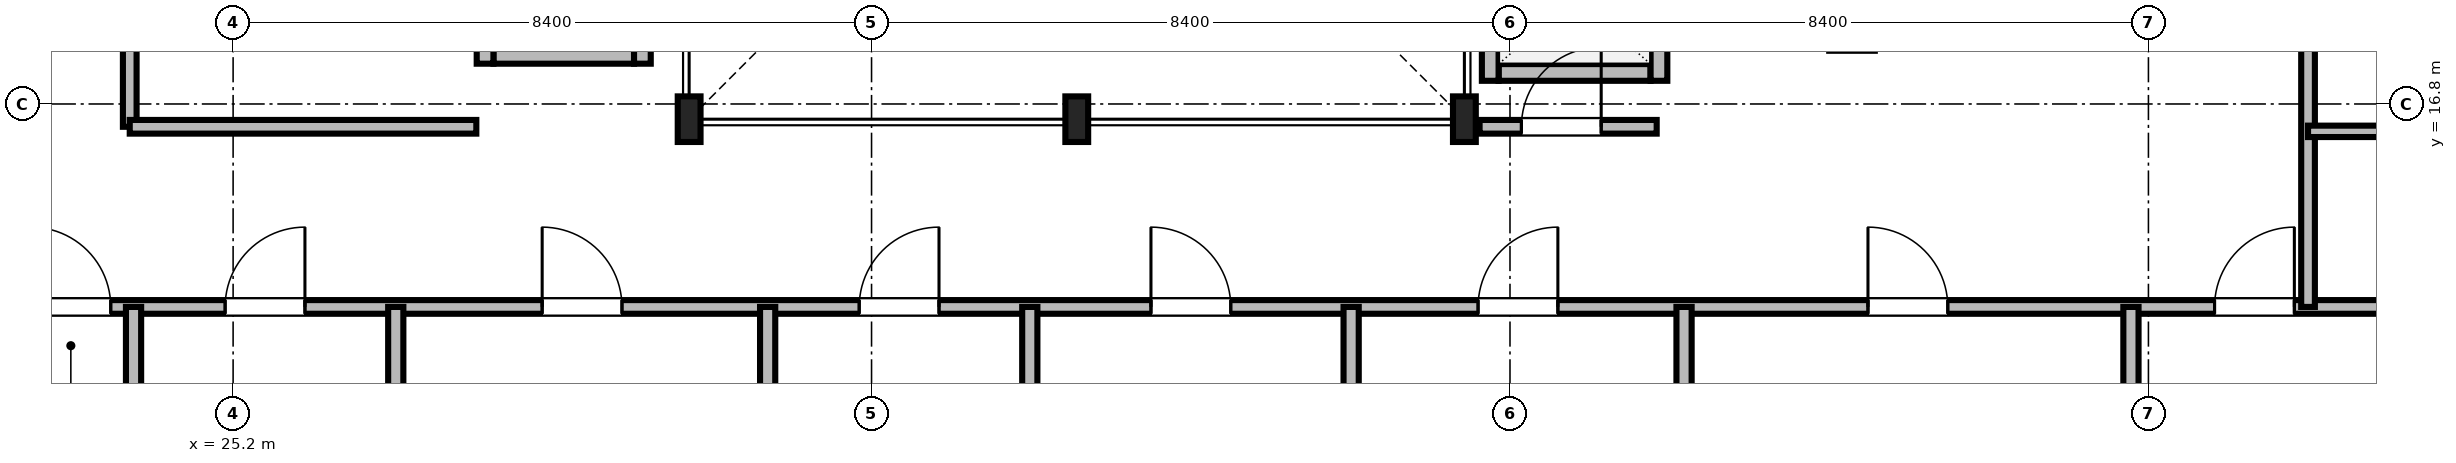
"""IFC4 building model, lengths in metres.
Left out: names, types, materials, properties, quantities, classifications, styles, units other than length and angle.
Written with IfcOpenShell. Run it as: python <this file> out.ifc"""

import sys

from ifc_helpers import new_model, si_unit, direction, frame, frame_2d, origin, origin_2d, place, context, subcontext, project, spatial, rectangle, i_section, extrude, source, transform, mapped, element, fill, save


model = new_model("IFC4")
c1 = context("Model", 3, precision=1e-05, world=origin(), true_north=direction((0.0, 1.0)))
c2 = subcontext(c1, "Body", "Model", "MODEL_VIEW")
j1 = project(units=[si_unit("LENGTHUNIT", "METRE"), si_unit("PLANEANGLEUNIT", "RADIAN")], contexts=[c1])
p1 = place(None, origin())
s1 = spatial("IfcSite", under=j1, at=p1, CompositionType="ELEMENT")
p2 = place(p1, origin())
s2 = spatial("IfcBuilding", under=s1, at=p2, CompositionType="ELEMENT")
p3 = place(p2, frame((0.0, 0.0, 266.4)))
s3 = spatial("IfcBuildingStorey", under=s2, at=p3, CompositionType="ELEMENT", Elevation=266.4)
m1 = source(origin(), c2, "Body", "SweptSolid", [
    extrude(i_section(OverallWidth=0.3, OverallDepth=0.6, WebThickness=0.015, FlangeThickness=0.03, FilletRadius=0.027, at=origin_2d()), origin(), (0.0, 0.0, 1.0), 3.65),
])
for number, where, z_axis, x_axis in (
    (1, (31.2, 16.6, 0.0), (0.0, 0.0, 1.0), (1.0, 0.0, 0.0)),
    (2, (36.3, 16.6, 0.0), (0.0, 0.0, 1.0), (1.0, 0.0, 0.0)),
    (3, (41.4, 16.6, 0.0), (0.0, 0.0, 1.0), (1.0, 0.0, 0.0)),
):
    element("IfcColumn", number, at=place(p3, frame(where, z_axis=z_axis, x_axis=x_axis)), inside=s3, PredefinedType="COLUMN", context=c2, shape_type="MappedRepresentation", body=[
        mapped(m1, transform((0.0, 0.0, 0.0), scale=1.0)),
    ])
m2 = source(origin(), c2, "Body", "SweptSolid", [
    extrude(rectangle(XDim=2.0, YDim=0.22, at=frame_2d((1.0, 0.0))), origin(), (0.0, 0.0, 1.0), 3.65),
])
p4 = place(p3, frame((41.85, 17.215, 0.0), z_axis=(0.0, 0.0, 1.0), x_axis=(1.0, 0.0, 0.0)))
e4 = element("IfcWall", 4, at=p4, inside=s3, PredefinedType="SOLIDWALL", context=c2, shape_type="MappedRepresentation", body=[
    mapped(m2, transform((0.0, 0.0, 0.0), scale=1.0)),
])
m3 = source(origin(), c2, "Body", "SweptSolid", [
    extrude(rectangle(XDim=2.19, YDim=0.22, at=frame_2d((1.095, 0.0))), origin(), (0.0, 0.0, 1.0), 3.65),
])
p5 = place(p3, frame((41.74, 17.105, 0.0), z_axis=(0.0, 0.0, 1.0), x_axis=(0.0, 1.0, 0.0)))
e5 = element("IfcWall", 5, at=p5, inside=s3, PredefinedType="SOLIDWALL", context=c2, shape_type="MappedRepresentation", body=[
    mapped(m3, transform((0.0, 0.0, 0.0), scale=1.0)),
])
p6 = place(p3, frame((43.96, 17.105, 0.0), z_axis=(0.0, 0.0, 1.0), x_axis=(0.0, 1.0, 0.0)))
e6 = element("IfcWall", 6, at=p6, inside=s3, PredefinedType="SOLIDWALL", context=c2, shape_type="MappedRepresentation", body=[
    mapped(m3, transform((0.0, 0.0, 0.0), scale=1.0)),
])
m4 = source(origin(), c2, "Body", "SweptSolid", [
    extrude(rectangle(XDim=1.1, YDim=2.2, at=frame_2d((0.55, 1.1))), frame((0.0, 0.12, 0.0), z_axis=(0.0, -1.0, 0.0), x_axis=(1.0, 0.0, 0.0)), (0.0, 0.0, 1.0), 0.24),
])
p7 = place(p6, frame((0.545, 0.0, 0.0)))
e7 = element("IfcOpeningElement", 7, at=p7, cuts=e6, PredefinedType="OPENING", context=c2, shape_type="MappedRepresentation", body=[
    mapped(m4, transform((0.0, 0.0, 0.0), scale=1.0)),
])
m5 = source(origin(), c2, "Body", "SweptSolid", [
    extrude(rectangle(XDim=1.85, YDim=0.22, at=frame_2d((0.925, 0.0))), origin(), (0.0, 0.0, 1.0), 3.65),
])
p8 = place(p3, frame((28.625, 17.44, 0.0), z_axis=(0.0, 0.0, 1.0), x_axis=(1.0, 0.0, 0.0)))
e8 = element("IfcWall", 8, at=p8, inside=s3, PredefinedType="SOLIDWALL", context=c2, shape_type="MappedRepresentation", body=[
    mapped(m5, transform((0.0, 0.0, 0.0), scale=1.0)),
])
m6 = source(origin(), c2, "Body", "SweptSolid", [
    extrude(rectangle(XDim=2.54, YDim=0.22, at=frame_2d((1.27, 0.0))), origin(), (0.0, 0.0, 1.0), 3.65),
])
for number, where, z_axis, x_axis in (
    (9, (28.515, 17.33, 0.0), (0.0, 0.0, 1.0), (0.0, 1.0, 0.0)),
    (10, (30.585, 17.33, 0.0), (0.0, 0.0, 1.0), (0.0, 1.0, 0.0)),
):
    element("IfcWall", number, at=place(p3, frame(where, z_axis=z_axis, x_axis=x_axis)), inside=s3, PredefinedType="SOLIDWALL", context=c2, shape_type="MappedRepresentation", body=[
        mapped(m6, transform((0.0, 0.0, 0.0), scale=1.0)),
    ])
m7 = source(origin(), c2, "Body", "SweptSolid", [
    extrude(rectangle(XDim=42.916, YDim=0.18, at=frame_2d((21.458, 0.0))), origin(), (0.0, 0.0, 1.0), 2.892),
])
p9 = place(p3, frame((17.542, 14.13, 0.0), z_axis=(0.0, 0.0, 1.0), x_axis=(1.0, 0.0, 0.0)))
e11 = element("IfcWall", 11, at=p9, inside=s3, PredefinedType="PARTITIONING", context=c2, shape_type="MappedRepresentation", body=[
    mapped(m7, transform((0.0, 0.0, 0.0), scale=1.0)),
])
m8 = source(origin(), c2, "Body", "SweptSolid", [
    extrude(rectangle(XDim=1.05, YDim=2.2, at=frame_2d((0.525, 1.1))), frame((0.0, 0.1, 0.0), z_axis=(0.0, -1.0, 0.0), x_axis=(1.0, 0.0, 0.0)), (0.0, 0.0, 1.0), 0.2),
])
p10 = place(p9, frame((4.998, 0.0, 0.0)))
e12 = element("IfcOpeningElement", 12, at=p10, cuts=e11, PredefinedType="OPENING", context=c2, shape_type="MappedRepresentation", body=[
    mapped(m8, transform((0.0, 0.0, 0.0), scale=1.0)),
])
p11 = place(p9, frame((7.553, 0.0, 0.0)))
e13 = element("IfcOpeningElement", 13, at=p11, cuts=e11, PredefinedType="OPENING", context=c2, shape_type="MappedRepresentation", body=[
    mapped(m8, transform((0.0, 0.0, 0.0), scale=1.0)),
])
p12 = place(p9, frame((11.724, 0.0, 0.0)))
e14 = element("IfcOpeningElement", 14, at=p12, cuts=e11, PredefinedType="OPENING", context=c2, shape_type="MappedRepresentation", body=[
    mapped(m8, transform((0.0, 0.0, 0.0), scale=1.0)),
])
p13 = place(p9, frame((15.896, 0.0, 0.0)))
e15 = element("IfcOpeningElement", 15, at=p13, cuts=e11, PredefinedType="OPENING", context=c2, shape_type="MappedRepresentation", body=[
    mapped(m8, transform((0.0, 0.0, 0.0), scale=1.0)),
])
p14 = place(p9, frame((19.734, 0.0, 0.0)))
e16 = element("IfcOpeningElement", 16, at=p14, cuts=e11, PredefinedType="OPENING", context=c2, shape_type="MappedRepresentation", body=[
    mapped(m8, transform((0.0, 0.0, 0.0), scale=1.0)),
])
p15 = place(p9, frame((24.038, 0.0, 0.0)))
e17 = element("IfcOpeningElement", 17, at=p15, cuts=e11, PredefinedType="OPENING", context=c2, shape_type="MappedRepresentation", body=[
    mapped(m8, transform((0.0, 0.0, 0.0), scale=1.0)),
])
p16 = place(p9, frame((29.168, 0.0, 0.0)))
e18 = element("IfcOpeningElement", 18, at=p16, cuts=e11, PredefinedType="OPENING", context=c2, shape_type="MappedRepresentation", body=[
    mapped(m8, transform((0.0, 0.0, 0.0), scale=1.0)),
])
p17 = place(p9, frame((33.728, 0.0, 0.0)))
e19 = element("IfcOpeningElement", 19, at=p17, cuts=e11, PredefinedType="OPENING", context=c2, shape_type="MappedRepresentation", body=[
    mapped(m8, transform((0.0, 0.0, 0.0), scale=1.0)),
])
m9 = source(origin(), c2, "Body", "SweptSolid", [
    extrude(rectangle(XDim=26.97, YDim=0.18, at=frame_2d((13.485, 0.0))), origin(), (0.0, 0.0, 1.0), 3.092),
])
p18 = place(p3, frame((52.5, 14.13, 0.0), z_axis=(0.0, 0.0, 1.0), x_axis=(0.0, 1.0, 0.0)))
e20 = element("IfcWall", 20, at=p18, inside=s3, PredefinedType="PARTITIONING", context=c2, shape_type="MappedRepresentation", body=[
    mapped(m9, transform((0.0, 0.0, 0.0), scale=1.0)),
])
p19 = place(p18, frame((4.009, 0.0, 0.0)))
e21 = element("IfcOpeningElement", 21, at=p19, cuts=e20, PredefinedType="OPENING", context=c2, shape_type="MappedRepresentation", body=[
    mapped(m8, transform((0.0, 0.0, 0.0), scale=1.0)),
])
p20 = place(p18, frame((10.696, 0.0, 0.0)))
e22 = element("IfcOpeningElement", 22, at=p20, cuts=e20, PredefinedType="OPENING", context=c2, shape_type="MappedRepresentation", body=[
    mapped(m8, transform((0.0, 0.0, 0.0), scale=1.0)),
])
p21 = place(p18, frame((17.384, 0.0, 0.0)))
e23 = element("IfcOpeningElement", 23, at=p21, cuts=e20, PredefinedType="OPENING", context=c2, shape_type="MappedRepresentation", body=[
    mapped(m8, transform((0.0, 0.0, 0.0), scale=1.0)),
])
p22 = place(p18, frame((24.071, 0.0, 0.0)))
e24 = element("IfcOpeningElement", 24, at=p22, cuts=e20, PredefinedType="OPENING", context=c2, shape_type="MappedRepresentation", body=[
    mapped(m8, transform((0.0, 0.0, 0.0), scale=1.0)),
])
m10 = source(origin(), c2, "Body", "SweptSolid", [
    extrude(rectangle(XDim=3.55, YDim=0.18, at=frame_2d((1.775, 0.0))), origin(), (0.0, 0.0, 1.0), 3.65),
])
p23 = place(p3, frame((23.84, 16.5, 0.0), z_axis=(0.0, 0.0, 1.0), x_axis=(0.0, 1.0, 0.0)))
e25 = element("IfcWall", 25, at=p23, inside=s3, PredefinedType="PARTITIONING", context=c2, shape_type="MappedRepresentation", body=[
    mapped(m10, transform((0.0, 0.0, 0.0), scale=1.0)),
])
p24 = place(p23, frame((1.15, 0.0, 0.0)))
e26 = element("IfcOpeningElement", 26, at=p24, cuts=e25, PredefinedType="OPENING", context=c2, shape_type="MappedRepresentation", body=[
    mapped(m8, transform((0.0, 0.0, 0.0), scale=1.0)),
])
m11 = source(origin(), c2, "Body", "SweptSolid", [
    extrude(rectangle(XDim=2.33, YDim=0.18, at=frame_2d((1.165, 0.0))), origin(), (0.0, 0.0, 1.0), 3.092),
])
p25 = place(p3, frame((41.6, 16.5, 0.0), z_axis=(0.0, 0.0, 1.0), x_axis=(1.0, 0.0, 0.0)))
e27 = element("IfcWall", 27, at=p25, inside=s3, PredefinedType="PARTITIONING", context=c2, shape_type="MappedRepresentation", body=[
    mapped(m11, transform((0.0, 0.0, 0.0), scale=1.0)),
])
p26 = place(p25, frame((0.55, 0.0, 0.0)))
e28 = element("IfcOpeningElement", 28, at=p26, cuts=e27, PredefinedType="OPENING", context=c2, shape_type="MappedRepresentation", body=[
    mapped(m8, transform((0.0, 0.0, 0.0), scale=1.0)),
])
m12 = source(origin(), c2, "Body", "SweptSolid", [
    extrude(rectangle(XDim=10.388, YDim=0.2, at=frame_2d((5.194, 0.0))), origin(), (0.0, 0.0, 1.0), 2.892),
])
for number, where, z_axis, x_axis in (
    (29, (23.89, 3.742, 0.0), (0.0, 0.0, 1.0), (0.0, 1.0, 0.0)),
    (30, (27.34, 3.742, 0.0), (0.0, 0.0, 1.0), (0.0, 1.0, 0.0)),
    (31, (32.233, 3.742, 0.0), (0.0, 0.0, 1.0), (0.0, 1.0, 0.0)),
    (32, (35.682, 3.742, 0.0), (0.0, 0.0, 1.0), (0.0, 1.0, 0.0)),
):
    element("IfcWall", number, at=place(p3, frame(where, z_axis=z_axis, x_axis=x_axis)), inside=s3, PredefinedType="PARTITIONING", context=c2, shape_type="MappedRepresentation", body=[
        mapped(m12, transform((0.0, 0.0, 0.0), scale=1.0)),
    ])
m13 = source(origin(), c2, "Body", "SweptSolid", [
    extrude(rectangle(XDim=10.58, YDim=0.2, at=frame_2d((5.29, 0.0))), origin(), (0.0, 0.0, 1.0), 2.892),
])
p27 = place(p3, frame((39.91, 3.55, 0.0), z_axis=(0.0, 0.0, 1.0), x_axis=(0.0, 1.0, 0.0)))
e33 = element("IfcWall", 33, at=p27, inside=s3, PredefinedType="PARTITIONING", context=c2, shape_type="MappedRepresentation", body=[
    mapped(m13, transform((0.0, 0.0, 0.0), scale=1.0)),
])
for number, where, z_axis, x_axis in (
    (34, (44.29, 3.742, 0.0), (0.0, 0.0, 1.0), (0.0, 1.0, 0.0)),
    (35, (50.17, 3.742, 0.0), (0.0, 0.0, 1.0), (0.0, 1.0, 0.0)),
):
    element("IfcWall", number, at=place(p3, frame(where, z_axis=z_axis, x_axis=x_axis)), inside=s3, PredefinedType="PARTITIONING", context=c2, shape_type="MappedRepresentation", body=[
        mapped(m12, transform((0.0, 0.0, 0.0), scale=1.0)),
    ])
m14 = source(origin(), c2, "Body", "SweptSolid", [
    extrude(rectangle(XDim=4.56, YDim=0.18, at=frame_2d((2.28, 0.0))), origin(), (0.0, 0.0, 1.0), 3.65),
])
p28 = place(p3, frame((23.84, 16.5, 0.0), z_axis=(0.0, 0.0, 1.0), x_axis=(1.0, 0.0, 0.0)))
e36 = element("IfcWall", 36, at=p28, inside=s3, PredefinedType="PARTITIONING", context=c2, shape_type="MappedRepresentation", body=[
    mapped(m14, transform((0.0, 0.0, 0.0), scale=1.0)),
])
m15 = source(origin(), c2, "Body", "SweptSolid", [
    extrude(rectangle(XDim=2.36, YDim=0.15, at=frame_2d((1.18, 0.0))), origin(), (0.0, 0.0, 1.0), 3.65),
])
p29 = place(p3, frame((52.5, 16.44, 0.0), z_axis=(0.0, 0.0, 1.0), x_axis=(1.0, 0.0, 0.0)))
e37 = element("IfcWall", 37, at=p29, inside=s3, PredefinedType="PARTITIONING", context=c2, shape_type="MappedRepresentation", body=[
    mapped(m15, transform((0.0, 0.0, 0.0), scale=1.0)),
])
m16 = source(origin(), c2, "Body", "SweptSolid", [
    extrude(rectangle(XDim=1.05, YDim=2.2, at=frame_2d((0.525, 1.1))), frame((0.0, 0.025, 0.0), z_axis=(0.0, -1.0, 0.0), x_axis=(1.0, 0.0, 0.0)), (0.0, 0.0, 1.0), 0.05),
])
p30 = place(p10, origin())
e38 = element("IfcDoor", 38, at=p30, inside=s3, OperationType="SINGLE_SWING_LEFT", PredefinedType="DOOR", context=c2, shape_type="MappedRepresentation", body=[
    mapped(m16, transform((0.0, 0.0, 0.0), scale=1.0)),
])
fill(e12, e38)
p31 = place(p11, origin())
e39 = element("IfcDoor", 39, at=p31, inside=s3, OperationType="SINGLE_SWING_RIGHT", PredefinedType="DOOR", context=c2, shape_type="MappedRepresentation", body=[
    mapped(m16, transform((0.0, 0.0, 0.0), scale=1.0)),
])
fill(e13, e39)
p32 = place(p12, origin())
e40 = element("IfcDoor", 40, at=p32, inside=s3, OperationType="SINGLE_SWING_LEFT", PredefinedType="DOOR", context=c2, shape_type="MappedRepresentation", body=[
    mapped(m16, transform((0.0, 0.0, 0.0), scale=1.0)),
])
fill(e14, e40)
p33 = place(p13, origin())
e41 = element("IfcDoor", 41, at=p33, inside=s3, OperationType="SINGLE_SWING_RIGHT", PredefinedType="DOOR", context=c2, shape_type="MappedRepresentation", body=[
    mapped(m16, transform((0.0, 0.0, 0.0), scale=1.0)),
])
fill(e15, e41)
p34 = place(p14, origin())
e42 = element("IfcDoor", 42, at=p34, inside=s3, OperationType="SINGLE_SWING_LEFT", PredefinedType="DOOR", context=c2, shape_type="MappedRepresentation", body=[
    mapped(m16, transform((0.0, 0.0, 0.0), scale=1.0)),
])
fill(e16, e42)
p35 = place(p15, origin())
e43 = element("IfcDoor", 43, at=p35, inside=s3, OperationType="SINGLE_SWING_RIGHT", PredefinedType="DOOR", context=c2, shape_type="MappedRepresentation", body=[
    mapped(m16, transform((0.0, 0.0, 0.0), scale=1.0)),
])
fill(e17, e43)
p36 = place(p16, origin())
e44 = element("IfcDoor", 44, at=p36, inside=s3, OperationType="SINGLE_SWING_LEFT", PredefinedType="DOOR", context=c2, shape_type="MappedRepresentation", body=[
    mapped(m16, transform((0.0, 0.0, 0.0), scale=1.0)),
])
fill(e18, e44)
p37 = place(p17, origin())
e45 = element("IfcDoor", 45, at=p37, inside=s3, OperationType="SINGLE_SWING_RIGHT", PredefinedType="DOOR", context=c2, shape_type="MappedRepresentation", body=[
    mapped(m16, transform((0.0, 0.0, 0.0), scale=1.0)),
])
fill(e19, e45)
p38 = place(p26, origin())
e46 = element("IfcDoor", 46, at=p38, inside=s3, OperationType="SINGLE_SWING_RIGHT", PredefinedType="DOOR", context=c2, shape_type="MappedRepresentation", body=[
    mapped(m16, transform((0.0, 0.0, 0.0), scale=1.0)),
])
fill(e28, e46)
save(model, sys.argv[1])
